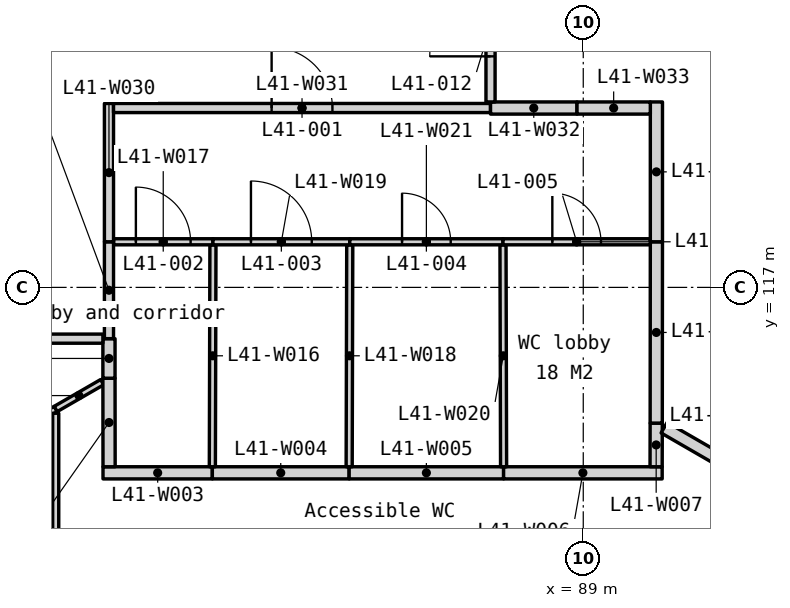
"""IFC4 building model, lengths in metres.
Left out: names, types, materials, properties, quantities, classifications, styles, units other than length and angle.
Written with IfcOpenShell. Run it as: python <this file> out.ifc"""

import sys

from ifc_helpers import new_model, si_unit, direction, frame, frame_2d, origin, place, context, subcontext, project, spatial, polyline, rectangle, outline, extrude, element, fill, save


model = new_model("IFC4")
c1 = context("Model", 3, precision=1e-05, world=origin(), true_north=direction((0.0, 1.0)))
c2 = subcontext(c1, "Body", "Model", "MODEL_VIEW")
j1 = project(units=[si_unit("LENGTHUNIT", "METRE"), si_unit("PLANEANGLEUNIT", "RADIAN")], contexts=[c1])
p1 = place(None, origin())
s1 = spatial("IfcSite", under=j1, at=p1, CompositionType="ELEMENT")
p2 = place(p1, origin())
s2 = spatial("IfcBuilding", under=s1, at=p2, CompositionType="ELEMENT")
p3 = place(p2, frame((0.0, 0.0, 163.7)))
s3 = spatial("IfcBuildingStorey", under=s2, at=p3, CompositionType="ELEMENT", Elevation=163.7)
p4 = place(p3, frame((88.166, 106.564, -0.15), z_axis=(0.0, 0.0, 1.0), x_axis=(0.499995644604, 0.866027918359, 0.0)))
e1 = element("IfcWall", 1, at=p4, inside=s3, PredefinedType="SOLIDWALL", context=c2, shape_type="SweptSolid", body=[
    extrude(outline(polyline([(28.365, 3.9), (28.365, 0.0), (0.0, 0.0), (0.0, 3.9), (28.365, 3.9)])), frame((0.0, 0.225, 0.0), z_axis=(0.0, -1.0, 0.0), x_axis=(1.0, 0.0, 0.0)), (0.0, 0.0, 1.0), 0.45),
])
p5 = place(p4, frame((6.072, 0.0, 0.95)))
e2 = element("IfcOpeningElement", 2, at=p5, cuts=e1, PredefinedType="OPENING", context=c2, shape_type="SweptSolid", body=[
    extrude(rectangle(XDim=1.8, YDim=2.2, at=frame_2d((0.9, 1.1))), frame((0.0, 0.235, 0.0), z_axis=(0.0, -1.0, 0.0), x_axis=(1.0, 0.0, 0.0)), (0.0, 0.0, 1.0), 0.47),
])
p6 = place(p4, frame((8.372, 0.0, 0.95)))
e3 = element("IfcOpeningElement", 3, at=p6, cuts=e1, PredefinedType="OPENING", context=c2, shape_type="SweptSolid", body=[
    extrude(rectangle(XDim=1.8, YDim=2.2, at=frame_2d((0.9, 1.1))), frame((0.0, 0.235, 0.0), z_axis=(0.0, -1.0, 0.0), x_axis=(1.0, 0.0, 0.0)), (0.0, 0.0, 1.0), 0.47),
])
p7 = place(p4, frame((16.193, 0.0, 0.95)))
e4 = element("IfcOpeningElement", 4, at=p7, cuts=e1, PredefinedType="OPENING", context=c2, shape_type="SweptSolid", body=[
    extrude(rectangle(XDim=1.8, YDim=2.2, at=frame_2d((0.9, 1.1))), frame((0.0, 0.235, 0.0), z_axis=(0.0, -1.0, 0.0), x_axis=(1.0, 0.0, 0.0)), (0.0, 0.0, 1.0), 0.47),
])
p8 = place(p4, frame((18.493, 0.0, 0.95)))
e5 = element("IfcOpeningElement", 5, at=p8, cuts=e1, PredefinedType="OPENING", context=c2, shape_type="SweptSolid", body=[
    extrude(rectangle(XDim=1.8, YDim=2.2, at=frame_2d((0.9, 1.1))), frame((0.0, 0.235, 0.0), z_axis=(0.0, -1.0, 0.0), x_axis=(1.0, 0.0, 0.0)), (0.0, 0.0, 1.0), 0.47),
])
p9 = place(p4, frame((26.327, 0.0, 0.95)))
e6 = element("IfcOpeningElement", 6, at=p9, cuts=e1, PredefinedType="OPENING", context=c2, shape_type="SweptSolid", body=[
    extrude(rectangle(XDim=1.2, YDim=2.2, at=frame_2d((0.6, 1.1))), frame((0.0, 0.235, 0.0), z_axis=(0.0, -1.0, 0.0), x_axis=(1.0, 0.0, 0.0)), (0.0, 0.0, 1.0), 0.47),
])
p10 = place(p3, frame((70.499, 109.328, 0.0), z_axis=(0.0, 0.0, 1.0), x_axis=(0.866029704776, 0.49999255039, 0.0)))
e7 = element("IfcWall", 7, at=p10, inside=s3, PredefinedType="PARTITIONING", context=c2, shape_type="SweptSolid", body=[
    extrude(rectangle(XDim=11.345, YDim=0.1, at=frame_2d((5.673, 0.0))), origin(), (0.0, 0.0, 1.0), 3.75),
])
p11 = place(p10, frame((5.223, 0.0, 0.0)))
e8 = element("IfcOpeningElement", 8, at=p11, cuts=e7, PredefinedType="OPENING", context=c2, shape_type="SweptSolid", body=[
    extrude(rectangle(XDim=0.9, YDim=2.1, at=frame_2d((0.45, 1.05))), frame((0.0, 0.06, 0.0), z_axis=(0.0, -1.0, 0.0), x_axis=(1.0, 0.0, 0.0)), (0.0, 0.0, 1.0), 0.12),
])
p12 = place(p3, frame((81.102, 113.95, 0.0), z_axis=(0.0, 0.0, 1.0), x_axis=(1.0, 0.0, 0.0)))
e9 = element("IfcWall", 9, at=p12, inside=s3, PredefinedType="PARTITIONING", context=c2, shape_type="SweptSolid", body=[
    extrude(rectangle(XDim=1.798, YDim=0.2, at=frame_2d((0.899, 0.0))), origin(), (0.0, 0.0, 1.0), 3.75),
])
p13 = place(p3, frame((82.9, 113.95, 0.0), z_axis=(0.0, 0.0, 1.0), x_axis=(1.0, 0.0, 0.0)))
e10 = element("IfcWall", 10, at=p13, inside=s3, PredefinedType="PARTITIONING", context=c2, shape_type="SweptSolid", body=[
    extrude(rectangle(XDim=2.25, YDim=0.2, at=frame_2d((1.125, 0.0))), origin(), (0.0, 0.0, 1.0), 3.75),
])
p14 = place(p3, frame((85.15, 113.95, 0.0), z_axis=(0.0, 0.0, 1.0), x_axis=(1.0, 0.0, 0.0)))
e11 = element("IfcWall", 11, at=p14, inside=s3, PredefinedType="PARTITIONING", context=c2, shape_type="SweptSolid", body=[
    extrude(rectangle(XDim=2.54, YDim=0.2, at=frame_2d((1.27, 0.0))), origin(), (0.0, 0.0, 1.0), 3.75),
])
p15 = place(p3, frame((87.69, 113.95, 0.0), z_axis=(0.0, 0.0, 1.0), x_axis=(1.0, 0.0, 0.0)))
e12 = element("IfcWall", 12, at=p15, inside=s3, PredefinedType="PARTITIONING", context=c2, shape_type="SweptSolid", body=[
    extrude(rectangle(XDim=2.608, YDim=0.2, at=frame_2d((1.304, 0.0))), origin(), (0.0, 0.0, 1.0), 3.75),
])
p16 = place(p3, frame((90.198, 114.05, 0.0), z_axis=(0.0, 0.0, 1.0), x_axis=(0.002380945632, 0.999997165545, 0.0)))
e13 = element("IfcWall", 13, at=p16, inside=s3, PredefinedType="PARTITIONING", context=c2, shape_type="SweptSolid", body=[
    extrude(rectangle(XDim=0.718, YDim=0.2, at=frame_2d((0.359, 0.0))), origin(), (0.0, 0.0, 1.0), 3.75),
])
p17 = place(p3, frame((90.33, 114.693, 0.0), z_axis=(0.0, 0.0, 1.0), x_axis=(0.866009734793, -0.500027138508, 0.0)))
e14 = element("IfcWall", 14, at=p17, inside=s3, PredefinedType="PARTITIONING", context=c2, shape_type="SweptSolid", body=[
    extrude(rectangle(XDim=1.965, YDim=0.2, at=frame_2d((0.983, 0.0))), origin(), (0.0, 0.0, 1.0), 3.75),
])
p18 = place(p3, frame((90.2, 114.768, 0.0), z_axis=(0.0, 0.0, 1.0), x_axis=(0.000982398216, 0.999999517447, 0.0)))
e15 = element("IfcWall", 15, at=p18, inside=s3, PredefinedType="PARTITIONING", context=c2, shape_type="SweptSolid", body=[
    extrude(rectangle(XDim=2.982, YDim=0.2, at=frame_2d((1.491, 0.0))), origin(), (0.0, 0.0, 1.0), 3.75),
])
p19 = place(p3, frame((80.324, 96.404, 0.0), z_axis=(0.0, 0.0, 1.0), x_axis=(0.0, 1.0, 0.0)))
e16 = element("IfcWall", 16, at=p19, inside=s3, PredefinedType="PARTITIONING", context=c2, shape_type="SweptSolid", body=[
    extrude(rectangle(XDim=18.526, YDim=0.1, at=frame_2d((9.263, 0.0))), origin(), (0.0, 0.0, 1.0), 3.75),
])
p20 = place(p19, frame((8.813, 0.0, 0.0)))
e17 = element("IfcOpeningElement", 17, at=p20, cuts=e16, PredefinedType="OPENING", context=c2, shape_type="SweptSolid", body=[
    extrude(rectangle(XDim=0.9, YDim=2.1, at=frame_2d((0.45, 1.05))), frame((0.0, 0.06, 0.0), z_axis=(0.0, -1.0, 0.0), x_axis=(1.0, 0.0, 0.0)), (0.0, 0.0, 1.0), 0.12),
])
p21 = place(p3, frame((80.324, 115.0, 0.0), z_axis=(0.0, 0.0, 1.0), x_axis=(0.866070288904, 0.499922248632, 0.0)))
e18 = element("IfcWall", 18, at=p21, inside=s3, PredefinedType="PARTITIONING", context=c2, shape_type="SweptSolid", body=[
    extrude(rectangle(XDim=0.882, YDim=0.1, at=frame_2d((0.441, 0.0))), origin(), (0.0, 0.0, 1.0), 3.75),
])
p22 = place(p3, frame((81.202, 114.05, 0.0), z_axis=(0.0, 0.0, 1.0), x_axis=(-0.001341605366, 0.999999100047, 0.0)))
e19 = element("IfcWall", 19, at=p22, inside=s3, PredefinedType="PARTITIONING", context=c2, shape_type="SweptSolid", body=[
    extrude(rectangle(XDim=1.456, YDim=0.2, at=frame_2d((0.728, 0.0))), origin(), (0.0, 0.0, 1.0), 3.75),
])
p23 = place(p3, frame((81.2, 115.506, 0.0), z_axis=(0.0, 0.0, 1.0), x_axis=(0.0, 1.0, 0.0)))
e20 = element("IfcWall", 20, at=p23, inside=s3, PredefinedType="PARTITIONING", context=c2, shape_type="SweptSolid", body=[
    extrude(rectangle(XDim=0.651, YDim=0.2, at=frame_2d((0.325, 0.0))), origin(), (0.0, 0.0, 1.0), 3.75),
])
p24 = place(p3, frame((78.875, 116.157, 0.0), z_axis=(0.0, 0.0, 1.0), x_axis=(1.0, 0.0, 0.0)))
e21 = element("IfcWall", 21, at=p24, inside=s3, PredefinedType="PARTITIONING", context=c2, shape_type="SweptSolid", body=[
    extrude(rectangle(XDim=2.225, YDim=0.15, at=frame_2d((1.113, 0.0))), origin(), (0.0, 0.0, 1.0), 3.75),
])
p25 = place(p3, frame((82.9, 114.05, 0.0), z_axis=(0.0, 0.0, 1.0), x_axis=(0.002675575707, 0.999996420641, 0.0)))
e22 = element("IfcWall", 22, at=p25, inside=s3, PredefinedType="PARTITIONING", context=c2, shape_type="SweptSolid", body=[
    extrude(rectangle(XDim=3.65, YDim=0.1, at=frame_2d((1.825, 0.0))), origin(), (0.0, 0.0, 1.0), 3.75),
])
p26 = place(p3, frame((81.275, 117.75, 0.0), z_axis=(0.0, 0.0, 1.0), x_axis=(1.0, 0.0, 0.0)))
e23 = element("IfcWall", 23, at=p26, inside=s3, PredefinedType="PARTITIONING", context=c2, shape_type="SweptSolid", body=[
    extrude(rectangle(XDim=1.635, YDim=0.1, at=frame_2d((0.817, 0.0))), origin(), (0.0, 0.0, 1.0), 3.75),
])
p27 = place(p26, frame((0.367, 0.0, 0.0)))
e24 = element("IfcOpeningElement", 24, at=p27, cuts=e23, PredefinedType="OPENING", context=c2, shape_type="SweptSolid", body=[
    extrude(rectangle(XDim=0.9, YDim=2.1, at=frame_2d((0.45, 1.05))), frame((0.0, 0.06, 0.0), z_axis=(0.0, -1.0, 0.0), x_axis=(1.0, 0.0, 0.0)), (0.0, 0.0, 1.0), 0.12),
])
p28 = place(p3, frame((85.15, 114.05, 0.0), z_axis=(0.0, 0.0, 1.0), x_axis=(0.002675575707, 0.999996420641, 0.0)))
e25 = element("IfcWall", 25, at=p28, inside=s3, PredefinedType="PARTITIONING", context=c2, shape_type="SweptSolid", body=[
    extrude(rectangle(XDim=3.65, YDim=0.1, at=frame_2d((1.825, 0.0))), origin(), (0.0, 0.0, 1.0), 3.75),
])
p29 = place(p3, frame((82.91, 117.75, 0.0), z_axis=(0.0, 0.0, 1.0), x_axis=(1.0, 0.0, 0.0)))
e26 = element("IfcWall", 26, at=p29, inside=s3, PredefinedType="PARTITIONING", context=c2, shape_type="SweptSolid", body=[
    extrude(rectangle(XDim=2.25, YDim=0.1, at=frame_2d((1.125, 0.0))), origin(), (0.0, 0.0, 1.0), 3.75),
])
p30 = place(p29, frame((0.625, 0.0, 0.0)))
e27 = element("IfcOpeningElement", 27, at=p30, cuts=e26, PredefinedType="OPENING", context=c2, shape_type="SweptSolid", body=[
    extrude(rectangle(XDim=1.0, YDim=2.1, at=frame_2d((0.5, 1.05))), frame((0.0, 0.06, 0.0), z_axis=(0.0, -1.0, 0.0), x_axis=(1.0, 0.0, 0.0)), (0.0, 0.0, 1.0), 0.12),
])
p31 = place(p3, frame((87.69, 114.05, 0.0), z_axis=(0.0, 0.0, 1.0), x_axis=(-0.002608686776, 0.999996597371, 0.0)))
e28 = element("IfcWall", 28, at=p31, inside=s3, PredefinedType="PARTITIONING", context=c2, shape_type="SweptSolid", body=[
    extrude(rectangle(XDim=3.65, YDim=0.1, at=frame_2d((1.825, 0.0))), origin(), (0.0, 0.0, 1.0), 3.75),
])
p32 = place(p3, frame((85.16, 117.75, 0.0), z_axis=(0.0, 0.0, 1.0), x_axis=(1.0, 0.0, 0.0)))
e29 = element("IfcWall", 29, at=p32, inside=s3, PredefinedType="PARTITIONING", context=c2, shape_type="SweptSolid", body=[
    extrude(rectangle(XDim=2.52, YDim=0.1, at=frame_2d((1.26, 0.0))), origin(), (0.0, 0.0, 1.0), 3.75),
])
p33 = place(p32, frame((0.86, 0.0, 0.0)))
e30 = element("IfcOpeningElement", 30, at=p33, cuts=e29, PredefinedType="OPENING", context=c2, shape_type="SweptSolid", body=[
    extrude(rectangle(XDim=0.8, YDim=2.1, at=frame_2d((0.4, 1.05))), frame((0.0, 0.06, 0.0), z_axis=(0.0, -1.0, 0.0), x_axis=(1.0, 0.0, 0.0)), (0.0, 0.0, 1.0), 0.12),
])
p34 = place(p3, frame((87.68, 117.75, 0.0), z_axis=(0.0, 0.0, 1.0), x_axis=(1.0, 0.0, 0.0)))
e31 = element("IfcWall", 31, at=p34, inside=s3, PredefinedType="PARTITIONING", context=c2, shape_type="SweptSolid", body=[
    extrude(rectangle(XDim=2.423, YDim=0.1, at=frame_2d((1.211, 0.0))), origin(), (0.0, 0.0, 1.0), 3.75),
])
p35 = place(p34, frame((0.812, 0.0, 0.0)))
e32 = element("IfcOpeningElement", 32, at=p35, cuts=e31, PredefinedType="OPENING", context=c2, shape_type="SweptSolid", body=[
    extrude(rectangle(XDim=0.8, YDim=2.1, at=frame_2d((0.4, 1.05))), frame((0.0, 0.06, 0.0), z_axis=(0.0, -1.0, 0.0), x_axis=(1.0, 0.0, 0.0)), (0.0, 0.0, 1.0), 0.12),
])
p36 = place(p3, frame((90.203, 117.75, 0.0), z_axis=(0.0, 0.0, 1.0), x_axis=(0.0, 1.0, 0.0)))
e33 = element("IfcWall", 33, at=p36, inside=s3, PredefinedType="PARTITIONING", context=c2, shape_type="SweptSolid", body=[
    extrude(rectangle(XDim=2.3, YDim=0.2, at=frame_2d((1.15, 0.0))), origin(), (0.0, 0.0, 1.0), 3.75),
])
p37 = place(p3, frame((81.2, 116.157, 0.0), z_axis=(0.0, 0.0, 1.0), x_axis=(0.0, 1.0, 0.0)))
e34 = element("IfcWall", 34, at=p37, inside=s3, PredefinedType="PARTITIONING", context=c2, shape_type="SweptSolid", body=[
    extrude(rectangle(XDim=1.593, YDim=0.15, at=frame_2d((0.797, 0.0))), origin(), (0.0, 0.0, 1.0), 3.75),
])
p38 = place(p3, frame((81.2, 117.75, 0.0), z_axis=(0.0, 0.0, 1.0), x_axis=(0.0, 1.0, 0.0)))
e35 = element("IfcWall", 35, at=p38, inside=s3, PredefinedType="PARTITIONING", context=c2, shape_type="SweptSolid", body=[
    extrude(rectangle(XDim=2.275, YDim=0.15, at=frame_2d((1.137, 0.0))), origin(), (0.0, 0.0, 1.0), 3.75),
])
p39 = place(p3, frame((81.275, 119.95, 0.0), z_axis=(0.0, 0.0, 1.0), x_axis=(1.0, 0.0, 0.0)))
e36 = element("IfcWall", 36, at=p39, inside=s3, PredefinedType="PARTITIONING", context=c2, shape_type="SweptSolid", body=[
    extrude(rectangle(XDim=6.2, YDim=0.15, at=frame_2d((3.1, 0.0))), origin(), (0.0, 0.0, 1.0), 3.75),
])
p40 = place(p39, frame((2.6, 0.0, 0.0)))
e37 = element("IfcOpeningElement", 37, at=p40, cuts=e36, PredefinedType="OPENING", context=c2, shape_type="SweptSolid", body=[
    extrude(rectangle(XDim=1.0, YDim=2.1, at=frame_2d((0.5, 1.05))), frame((0.0, 0.085, 0.0), z_axis=(0.0, -1.0, 0.0), x_axis=(1.0, 0.0, 0.0)), (0.0, 0.0, 1.0), 0.17),
])
p41 = place(p3, frame((87.475, 119.95, 0.0), z_axis=(0.0, 0.0, 1.0), x_axis=(1.0, 0.0, 0.0)))
e38 = element("IfcWall", 38, at=p41, inside=s3, PredefinedType="PARTITIONING", context=c2, shape_type="SweptSolid", body=[
    extrude(rectangle(XDim=1.422, YDim=0.2, at=frame_2d((0.711, 0.0))), origin(), (0.0, 0.0, 1.0), 3.75),
])
p42 = place(p3, frame((88.897, 119.95, 0.0), z_axis=(0.0, 0.0, 1.0), x_axis=(1.0, 0.0, 0.0)))
e39 = element("IfcWall", 39, at=p42, inside=s3, PredefinedType="PARTITIONING", context=c2, shape_type="SweptSolid", body=[
    extrude(rectangle(XDim=1.206, YDim=0.2, at=frame_2d((0.603, 0.0))), origin(), (0.0, 0.0, 1.0), 3.75),
])
p43 = place(p3, frame((87.475, 120.05, 0.0), z_axis=(0.0, 0.0, 1.0), x_axis=(0.0, 1.0, 0.0)))
e40 = element("IfcWall", 40, at=p43, inside=s3, PredefinedType="PARTITIONING", context=c2, shape_type="SweptSolid", body=[
    extrude(rectangle(XDim=2.5, YDim=0.15, at=frame_2d((1.25, 0.0))), origin(), (0.0, 0.0, 1.0), 3.75),
])
p44 = place(p43, frame((0.75, 0.0, 0.0)))
e41 = element("IfcOpeningElement", 41, at=p44, cuts=e40, PredefinedType="OPENING", context=c2, shape_type="SweptSolid", body=[
    extrude(rectangle(XDim=1.0, YDim=2.1, at=frame_2d((0.5, 1.05))), frame((0.0, 0.085, 0.0), z_axis=(0.0, -1.0, 0.0), x_axis=(1.0, 0.0, 0.0)), (0.0, 0.0, 1.0), 0.17),
])
p45 = place(p40, origin())
e42 = element("IfcDoor", 42, at=p45, inside=s3, OperationType="SINGLE_SWING_LEFT", PredefinedType="DOOR", context=c2, shape_type="SweptSolid", body=[
    extrude(rectangle(XDim=1.0, YDim=2.1, at=frame_2d((0.5, 1.05))), frame((0.0, 0.025, 0.0), z_axis=(0.0, -1.0, 0.0), x_axis=(1.0, 0.0, 0.0)), (0.0, 0.0, 1.0), 0.05),
])
fill(e37, e42)
p46 = place(p27, origin())
e43 = element("IfcDoor", 43, at=p46, inside=s3, OperationType="SINGLE_SWING_LEFT", PredefinedType="DOOR", context=c2, shape_type="SweptSolid", body=[
    extrude(rectangle(XDim=0.9, YDim=2.1, at=frame_2d((0.45, 1.05))), frame((0.0, 0.025, 0.0), z_axis=(0.0, -1.0, 0.0), x_axis=(1.0, 0.0, 0.0)), (0.0, 0.0, 1.0), 0.05),
])
fill(e24, e43)
p47 = place(p30, origin())
e44 = element("IfcDoor", 44, at=p47, inside=s3, OperationType="SINGLE_SWING_LEFT", PredefinedType="DOOR", context=c2, shape_type="SweptSolid", body=[
    extrude(rectangle(XDim=1.0, YDim=2.1, at=frame_2d((0.5, 1.05))), frame((0.0, 0.025, 0.0), z_axis=(0.0, -1.0, 0.0), x_axis=(1.0, 0.0, 0.0)), (0.0, 0.0, 1.0), 0.05),
])
fill(e27, e44)
p48 = place(p33, origin())
e45 = element("IfcDoor", 45, at=p48, inside=s3, OperationType="SINGLE_SWING_LEFT", PredefinedType="DOOR", context=c2, shape_type="SweptSolid", body=[
    extrude(rectangle(XDim=0.8, YDim=2.1, at=frame_2d((0.4, 1.05))), frame((0.0, 0.025, 0.0), z_axis=(0.0, -1.0, 0.0), x_axis=(1.0, 0.0, 0.0)), (0.0, 0.0, 1.0), 0.05),
])
fill(e30, e45)
p49 = place(p35, origin())
e46 = element("IfcDoor", 46, at=p49, inside=s3, OperationType="SINGLE_SWING_LEFT", PredefinedType="DOOR", context=c2, shape_type="SweptSolid", body=[
    extrude(rectangle(XDim=0.8, YDim=2.1, at=frame_2d((0.4, 1.05))), frame((0.0, 0.025, 0.0), z_axis=(0.0, -1.0, 0.0), x_axis=(1.0, 0.0, 0.0)), (0.0, 0.0, 1.0), 0.05),
])
fill(e32, e46)
p50 = place(p44, origin())
e47 = element("IfcDoor", 47, at=p50, inside=s3, OperationType="SINGLE_SWING_LEFT", PredefinedType="DOOR", context=c2, shape_type="SweptSolid", body=[
    extrude(rectangle(XDim=1.0, YDim=2.1, at=frame_2d((0.5, 1.05))), frame((0.0, 0.025, 0.0), z_axis=(0.0, -1.0, 0.0), x_axis=(1.0, 0.0, 0.0)), (0.0, 0.0, 1.0), 0.05),
])
fill(e41, e47)
save(model, sys.argv[1])
